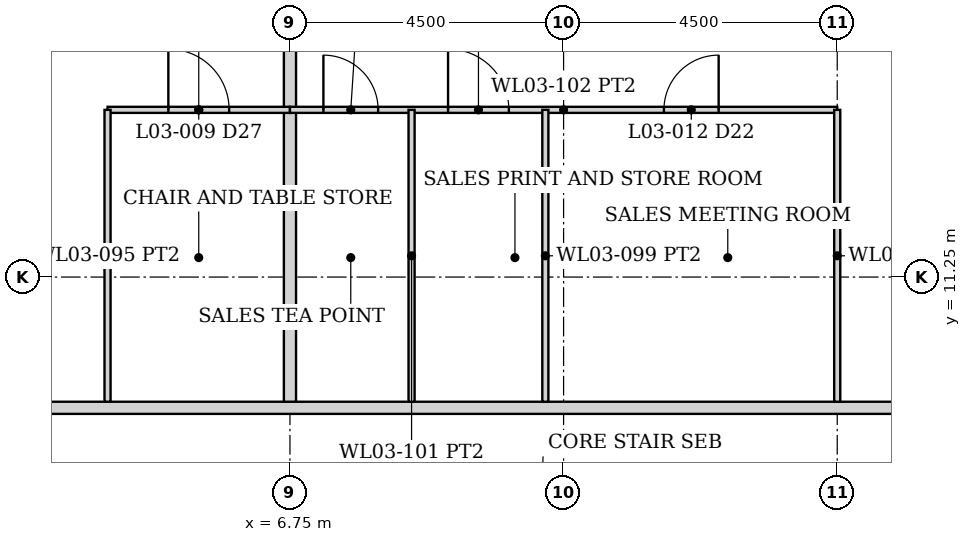
"""IFC4 building model, lengths in metres.
Left out: names, types, materials, properties, quantities, classifications, styles, units other than length and angle.
Written with IfcOpenShell. Run it as: python <this file> out.ifc"""

import sys

from ifc_helpers import new_model, si_unit, direction, frame, frame_2d, origin, place, context, subcontext, project, spatial, rectangle, extrude, element, fill, save


model = new_model("IFC4")
c1 = context("Model", 3, precision=1e-05, world=origin(), true_north=direction((0.0, 1.0)))
c2 = subcontext(c1, "Body", "Model", "MODEL_VIEW")
j1 = project(units=[si_unit("LENGTHUNIT", "METRE"), si_unit("PLANEANGLEUNIT", "RADIAN")], contexts=[c1])
p1 = place(None, origin())
s1 = spatial("IfcSite", under=j1, at=p1, CompositionType="ELEMENT")
p2 = place(p1, origin())
s2 = spatial("IfcBuilding", under=s1, at=p2, CompositionType="ELEMENT")
p3 = place(p2, frame((0.0, 0.0, 16.0)))
s3 = spatial("IfcBuildingStorey", under=s2, at=p3, CompositionType="ELEMENT", Elevation=16.0)
p4 = place(p3, frame((-25.075, 9.1, 0.0), z_axis=(0.0, 0.0, 1.0), x_axis=(1.0, 0.0, 0.0)))
e1 = element("IfcWall", 1, at=p4, inside=s3, PredefinedType="PARTITIONING", context=c2, shape_type="SweptSolid", body=[
    extrude(rectangle(XDim=50.15, YDim=0.2, at=frame_2d((25.075, 0.0))), origin(), (0.0, 0.0, 1.0), 4.329),
])
p5 = place(p4, frame((6.85, 0.0, 0.0)))
e2 = element("IfcOpeningElement", 2, at=p5, cuts=e1, PredefinedType="OPENING", context=c2, shape_type="SweptSolid", body=[
    extrude(rectangle(XDim=0.9, YDim=2.1, at=frame_2d((0.45, 1.05))), frame((0.0, 0.11, 0.0), z_axis=(0.0, -1.0, 0.0), x_axis=(1.0, 0.0, 0.0)), (0.0, 0.0, 1.0), 0.22),
])
p6 = place(p4, frame((24.075, 0.0, 0.0)))
e3 = element("IfcOpeningElement", 3, at=p6, cuts=e1, PredefinedType="OPENING", context=c2, shape_type="SweptSolid", body=[
    extrude(rectangle(XDim=2.0, YDim=2.4, at=frame_2d((1.0, 1.2))), frame((0.0, 0.11, 0.0), z_axis=(0.0, -1.0, 0.0), x_axis=(1.0, 0.0, 0.0)), (0.0, 0.0, 1.0), 0.22),
])
p7 = place(p4, frame((42.4, 0.0, 0.0)))
e4 = element("IfcOpeningElement", 4, at=p7, cuts=e1, PredefinedType="OPENING", context=c2, shape_type="SweptSolid", body=[
    extrude(rectangle(XDim=0.9, YDim=2.1, at=frame_2d((0.45, 1.05))), frame((0.0, 0.11, 0.0), z_axis=(0.0, -1.0, 0.0), x_axis=(1.0, 0.0, 0.0)), (0.0, 0.0, 1.0), 0.22),
])
p8 = place(p3, frame((6.75, 9.2, 0.0), z_axis=(0.0, 0.0, 1.0), x_axis=(0.0, 1.0, 0.0)))
e5 = element("IfcWall", 5, at=p8, inside=s3, PredefinedType="PARTITIONING", context=c2, shape_type="SweptSolid", body=[
    extrude(rectangle(XDim=19.889, YDim=0.2, at=frame_2d((9.944, 0.0))), origin(), (0.0, 0.0, 1.0), 4.329),
])
p9 = place(p3, frame((3.75, 14.0, 0.0), z_axis=(0.0, 0.0, 1.0), x_axis=(1.0, 0.0, 0.0)))
e6 = element("IfcWall", 6, at=p9, inside=s3, PredefinedType="PARTITIONING", context=c2, shape_type="SweptSolid", body=[
    extrude(rectangle(XDim=3.0, YDim=0.1, at=frame_2d((1.5, 0.0))), origin(), (0.0, 0.0, 1.0), 4.329),
])
p10 = place(p9, frame((1.0, 0.0, 0.0)))
e7 = element("IfcOpeningElement", 7, at=p10, cuts=e6, PredefinedType="OPENING", context=c2, shape_type="SweptSolid", body=[
    extrude(rectangle(XDim=1.0, YDim=2.1, at=frame_2d((0.5, 1.05))), frame((0.0, 0.06, 0.0), z_axis=(0.0, -1.0, 0.0), x_axis=(1.0, 0.0, 0.0)), (0.0, 0.0, 1.0), 0.12),
])
p11 = place(p3, frame((3.75, 9.2, 0.0), z_axis=(0.0, 0.0, 1.0), x_axis=(0.0, 1.0, 0.0)))
e8 = element("IfcWall", 8, at=p11, inside=s3, PredefinedType="PARTITIONING", context=c2, shape_type="SweptSolid", body=[
    extrude(rectangle(XDim=4.8, YDim=0.1, at=frame_2d((2.4, 0.0))), origin(), (0.0, 0.0, 1.0), 4.329),
])
p12 = place(p3, frame((6.75, 14.0, 0.0), z_axis=(0.0, 0.0, 1.0), x_axis=(1.0, 0.0, 0.0)))
e9 = element("IfcWall", 9, at=p12, inside=s3, PredefinedType="PARTITIONING", context=c2, shape_type="SweptSolid", body=[
    extrude(rectangle(XDim=9.0, YDim=0.1, at=frame_2d((4.5, 0.0))), origin(), (0.0, 0.0, 1.0), 4.329),
])
p13 = place(p12, frame((6.15, 0.0, 0.0)))
e10 = element("IfcOpeningElement", 10, at=p13, cuts=e9, PredefinedType="OPENING", context=c2, shape_type="SweptSolid", body=[
    extrude(rectangle(XDim=0.9, YDim=2.1, at=frame_2d((0.45, 1.05))), frame((0.0, 0.06, 0.0), z_axis=(0.0, -1.0, 0.0), x_axis=(1.0, 0.0, 0.0)), (0.0, 0.0, 1.0), 0.12),
])
p14 = place(p12, frame((2.6, 0.0, 0.0)))
e11 = element("IfcOpeningElement", 11, at=p14, cuts=e9, PredefinedType="OPENING", context=c2, shape_type="SweptSolid", body=[
    extrude(rectangle(XDim=1.0, YDim=2.1, at=frame_2d((0.5, 1.05))), frame((0.0, 0.06, 0.0), z_axis=(0.0, -1.0, 0.0), x_axis=(1.0, 0.0, 0.0)), (0.0, 0.0, 1.0), 0.12),
])
p15 = place(p12, frame((0.55, 0.0, 0.0)))
e12 = element("IfcOpeningElement", 12, at=p15, cuts=e9, PredefinedType="OPENING", context=c2, shape_type="SweptSolid", body=[
    extrude(rectangle(XDim=0.9, YDim=2.1, at=frame_2d((0.45, 1.05))), frame((0.0, 0.06, 0.0), z_axis=(0.0, -1.0, 0.0), x_axis=(1.0, 0.0, 0.0)), (0.0, 0.0, 1.0), 0.12),
])
for number, where, z_axis, x_axis in (
    (13, (8.75, 9.2, 0.0), (0.0, 0.0, 1.0), (0.0, 1.0, 0.0)),
    (14, (10.95, 9.2, 0.0), (0.0, 0.0, 1.0), (0.0, 1.0, 0.0)),
    (15, (15.75, 9.2, 0.0), (0.0, 0.0, 1.0), (0.0, 1.0, 0.0)),
):
    element("IfcWall", number, at=place(p3, frame(where, z_axis=z_axis, x_axis=x_axis)), inside=s3, PredefinedType="PARTITIONING", context=c2, shape_type="SweptSolid", body=[
        extrude(rectangle(XDim=4.8, YDim=0.1, at=frame_2d((2.4, 0.0))), origin(), (0.0, 0.0, 1.0), 4.329),
    ])
p16 = place(p10, origin())
e16 = element("IfcDoor", 16, at=p16, inside=s3, OperationType="SINGLE_SWING_LEFT", PredefinedType="DOOR", context=c2, shape_type="SweptSolid", body=[
    extrude(rectangle(XDim=1.0, YDim=2.1, at=frame_2d((0.5, 1.05))), frame((0.0, 0.025, 0.0), z_axis=(0.0, -1.0, 0.0), x_axis=(1.0, 0.0, 0.0)), (0.0, 0.0, 1.0), 0.05),
])
fill(e7, e16)
p17 = place(p13, origin())
e17 = element("IfcDoor", 17, at=p17, inside=s3, OperationType="SINGLE_SWING_RIGHT", PredefinedType="DOOR", context=c2, shape_type="SweptSolid", body=[
    extrude(rectangle(XDim=0.9, YDim=2.1, at=frame_2d((0.45, 1.05))), frame((0.0, 0.025, 0.0), z_axis=(0.0, -1.0, 0.0), x_axis=(1.0, 0.0, 0.0)), (0.0, 0.0, 1.0), 0.05),
])
fill(e10, e17)
p18 = place(p14, origin())
e18 = element("IfcDoor", 18, at=p18, inside=s3, OperationType="SINGLE_SWING_LEFT", PredefinedType="DOOR", context=c2, shape_type="SweptSolid", body=[
    extrude(rectangle(XDim=1.0, YDim=2.1, at=frame_2d((0.5, 1.05))), frame((0.0, 0.025, 0.0), z_axis=(0.0, -1.0, 0.0), x_axis=(1.0, 0.0, 0.0)), (0.0, 0.0, 1.0), 0.05),
])
fill(e11, e18)
p19 = place(p15, origin())
e19 = element("IfcDoor", 19, at=p19, inside=s3, OperationType="SINGLE_SWING_LEFT", PredefinedType="DOOR", context=c2, shape_type="SweptSolid", body=[
    extrude(rectangle(XDim=0.9, YDim=2.1, at=frame_2d((0.45, 1.05))), frame((0.0, 0.025, 0.0), z_axis=(0.0, -1.0, 0.0), x_axis=(1.0, 0.0, 0.0)), (0.0, 0.0, 1.0), 0.05),
])
fill(e12, e19)
save(model, sys.argv[1])
